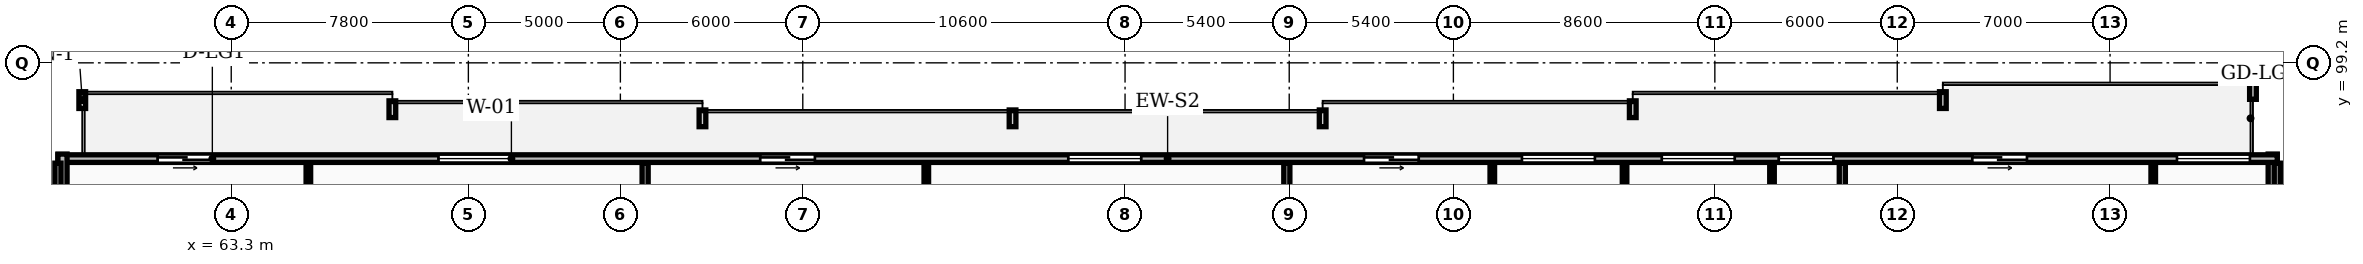
"""IFC4 building model, lengths in metres.
Left out: names, types, materials, properties, quantities, classifications, styles, units other than length and angle.
Written with IfcOpenShell. Run it as: python <this file> out.ifc"""

import sys

from ifc_helpers import new_model, si_unit, direction, frame, frame_2d, origin, place, context, subcontext, project, spatial, rectangle, extrude, element, fill, save


model = new_model("IFC4")
c1 = context("Model", 3, precision=1e-05, world=origin(), true_north=direction((0.0, 1.0)))
c2 = subcontext(c1, "Body", "Model", "MODEL_VIEW")
j1 = project(units=[si_unit("LENGTHUNIT", "METRE"), si_unit("PLANEANGLEUNIT", "RADIAN")], contexts=[c1])
p1 = place(None, origin())
s1 = spatial("IfcSite", under=j1, at=p1, CompositionType="ELEMENT")
p2 = place(p1, origin())
s2 = spatial("IfcBuilding", under=s1, at=p2, CompositionType="ELEMENT")
p3 = place(p2, frame((0.0, 0.0, 139.3)))
s3 = spatial("IfcBuildingStorey", under=s2, at=p3, CompositionType="ELEMENT", Elevation=139.3)
p4 = place(p3, frame((130.45, 92.6, 0.0), z_axis=(0.0, 0.0, 1.0), x_axis=(0.0, 1.0, 0.0)))
e1 = element("IfcWall", 1, at=p4, inside=s3, PredefinedType="STANDARD", context=c2, shape_type="SweptSolid", body=[
    extrude(rectangle(XDim=3.6, YDim=0.3, at=frame_2d((1.8, 0.0))), origin(), (0.0, 0.0, 1.0), 3.31),
])
p5 = place(p3, frame((130.6, 96.05, 0.0), z_axis=(0.0, 0.0, 1.0), x_axis=(-1.0, 0.0, 0.0)))
e2 = element("IfcWall", 2, at=p5, inside=s3, PredefinedType="STANDARD", context=c2, shape_type="SweptSolid", body=[
    extrude(rectangle(XDim=73.0, YDim=0.25, at=frame_2d((36.5, 0.0))), origin(), (0.0, 0.0, 1.0), 3.31),
])
p6 = place(p5, frame((67.921, 0.0, 0.0)))
e3 = element("IfcOpeningElement", 3, at=p6, cuts=e2, PredefinedType="OPENING", context=c2, shape_type="SweptSolid", body=[
    extrude(rectangle(XDim=1.8, YDim=2.2, at=frame_2d((0.9, 1.1))), frame((0.0, 0.135, 0.0), z_axis=(0.0, -1.0, 0.0), x_axis=(1.0, 0.0, 0.0)), (0.0, 0.0, 1.0), 0.27),
])
p7 = place(p5, frame((58.084, 0.0, 0.85)))
e4 = element("IfcOpeningElement", 4, at=p7, cuts=e2, PredefinedType="OPENING", context=c2, shape_type="SweptSolid", body=[
    extrude(rectangle(XDim=2.4, YDim=1.9, at=frame_2d((1.2, 0.95))), frame((0.0, 0.135, 0.0), z_axis=(0.0, -1.0, 0.0), x_axis=(1.0, 0.0, 0.0)), (0.0, 0.0, 1.0), 0.27),
])
p8 = place(p5, frame((48.101, 0.0, 0.0)))
e5 = element("IfcOpeningElement", 5, at=p8, cuts=e2, PredefinedType="OPENING", context=c2, shape_type="SweptSolid", body=[
    extrude(rectangle(XDim=1.8, YDim=2.2, at=frame_2d((0.9, 1.1))), frame((0.0, 0.135, 0.0), z_axis=(0.0, -1.0, 0.0), x_axis=(1.0, 0.0, 0.0)), (0.0, 0.0, 1.0), 0.27),
])
p9 = place(p5, frame((37.368, 0.0, 0.85)))
e6 = element("IfcOpeningElement", 6, at=p9, cuts=e2, PredefinedType="OPENING", context=c2, shape_type="SweptSolid", body=[
    extrude(rectangle(XDim=2.4, YDim=1.9, at=frame_2d((1.2, 0.95))), frame((0.0, 0.135, 0.0), z_axis=(0.0, -1.0, 0.0), x_axis=(1.0, 0.0, 0.0)), (0.0, 0.0, 1.0), 0.27),
])
p10 = place(p5, frame((22.445, 0.0, 0.85)))
e7 = element("IfcOpeningElement", 7, at=p10, cuts=e2, PredefinedType="OPENING", context=c2, shape_type="SweptSolid", body=[
    extrude(rectangle(XDim=2.4, YDim=1.9, at=frame_2d((1.2, 0.95))), frame((0.0, 0.135, 0.0), z_axis=(0.0, -1.0, 0.0), x_axis=(1.0, 0.0, 0.0)), (0.0, 0.0, 1.0), 0.27),
])
p11 = place(p5, frame((17.845, 0.0, 0.85)))
e8 = element("IfcOpeningElement", 8, at=p11, cuts=e2, PredefinedType="OPENING", context=c2, shape_type="SweptSolid", body=[
    extrude(rectangle(XDim=2.4, YDim=1.9, at=frame_2d((1.2, 0.95))), frame((0.0, 0.135, 0.0), z_axis=(0.0, -1.0, 0.0), x_axis=(1.0, 0.0, 0.0)), (0.0, 0.0, 1.0), 0.27),
])
p12 = place(p5, frame((28.239, 0.0, 0.0)))
e9 = element("IfcOpeningElement", 9, at=p12, cuts=e2, PredefinedType="OPENING", context=c2, shape_type="SweptSolid", body=[
    extrude(rectangle(XDim=1.8, YDim=2.2, at=frame_2d((0.9, 1.1))), frame((0.0, 0.135, 0.0), z_axis=(0.0, -1.0, 0.0), x_axis=(1.0, 0.0, 0.0)), (0.0, 0.0, 1.0), 0.27),
])
p13 = place(p5, frame((14.599, 0.0, 0.85)))
e10 = element("IfcOpeningElement", 10, at=p13, cuts=e2, PredefinedType="OPENING", context=c2, shape_type="SweptSolid", body=[
    extrude(rectangle(XDim=1.8, YDim=1.8, at=frame_2d((0.9, 0.9))), frame((0.0, 0.135, 0.0), z_axis=(0.0, -1.0, 0.0), x_axis=(1.0, 0.0, 0.0)), (0.0, 0.0, 1.0), 0.27),
])
p14 = place(p5, frame((8.234, 0.0, 0.0)))
e11 = element("IfcOpeningElement", 11, at=p14, cuts=e2, PredefinedType="OPENING", context=c2, shape_type="SweptSolid", body=[
    extrude(rectangle(XDim=1.8, YDim=2.2, at=frame_2d((0.9, 1.1))), frame((0.0, 0.135, 0.0), z_axis=(0.0, -1.0, 0.0), x_axis=(1.0, 0.0, 0.0)), (0.0, 0.0, 1.0), 0.27),
])
p15 = place(p5, frame((0.9, 0.0, 0.85)))
e12 = element("IfcOpeningElement", 12, at=p15, cuts=e2, PredefinedType="OPENING", context=c2, shape_type="SweptSolid", body=[
    extrude(rectangle(XDim=2.4, YDim=1.9, at=frame_2d((1.2, 0.95))), frame((0.0, 0.135, 0.0), z_axis=(0.0, -1.0, 0.0), x_axis=(1.0, 0.0, 0.0)), (0.0, 0.0, 1.0), 0.27),
])
p16 = place(p3, frame((57.75, 96.2, 0.0), z_axis=(0.0, 0.0, 1.0), x_axis=(0.0, -1.0, 0.0)))
e13 = element("IfcWall", 13, at=p16, inside=s3, PredefinedType="STANDARD", context=c2, shape_type="SweptSolid", body=[
    extrude(rectangle(XDim=3.6, YDim=0.3, at=frame_2d((1.8, 0.0))), origin(), (0.0, 0.0, 1.0), 3.31),
])
for number, where, z_axis, x_axis in (
    (14, (57.6, 69.83, 0.0), (0.0, 0.0, 1.0), (0.0, 1.0, 0.0)),
    (15, (130.6, 69.83, 0.0), (0.0, 0.0, 1.0), (0.0, 1.0, 0.0)),
    (16, (76.914, 69.83, 0.0), (0.0, 0.0, 1.0), (0.0, 1.0, 0.0)),
):
    element("IfcWall", number, at=place(p3, frame(where, z_axis=z_axis, x_axis=x_axis)), inside=s3, PredefinedType="PARTITIONING", context=c2, shape_type="SweptSolid", body=[
        extrude(rectangle(XDim=26.07, YDim=0.2, at=frame_2d((13.035, 0.0))), origin(), (0.0, 0.0, 1.0), 3.31),
    ])
p17 = place(p3, frame((65.837, 91.08, 0.0), z_axis=(0.0, 0.0, 1.0), x_axis=(0.0, 1.0, 0.0)))
e17 = element("IfcWall", 17, at=p17, inside=s3, PredefinedType="PARTITIONING", context=c2, shape_type="SweptSolid", body=[
    extrude(rectangle(XDim=4.82, YDim=0.15, at=frame_2d((2.41, 0.0))), origin(), (0.0, 0.0, 1.0), 3.31),
])
p18 = place(p3, frame((98.021, 69.83, 0.0), z_axis=(0.0, 0.0, 1.0), x_axis=(0.0, 1.0, 0.0)))
e18 = element("IfcWall", 18, at=p18, inside=s3, PredefinedType="PARTITIONING", context=c2, shape_type="SweptSolid", body=[
    extrude(rectangle(XDim=26.07, YDim=0.2, at=frame_2d((13.035, 0.0))), origin(), (0.0, 0.0, 1.0), 3.31),
])
p19 = place(p3, frame((86.163, 91.08, 0.0), z_axis=(0.0, 0.0, 1.0), x_axis=(0.0, 1.0, 0.0)))
e19 = element("IfcWall", 19, at=p19, inside=s3, PredefinedType="PARTITIONING", context=c2, shape_type="SweptSolid", body=[
    extrude(rectangle(XDim=4.82, YDim=0.15, at=frame_2d((2.41, 0.0))), origin(), (0.0, 0.0, 1.0), 3.31),
])
p20 = place(p3, frame((116.293, 69.83, 0.0), z_axis=(0.0, 0.0, 1.0), x_axis=(0.0, 1.0, 0.0)))
e20 = element("IfcWall", 20, at=p20, inside=s3, PredefinedType="PARTITIONING", context=c2, shape_type="SweptSolid", body=[
    extrude(rectangle(XDim=26.07, YDim=0.2, at=frame_2d((13.035, 0.0))), origin(), (0.0, 0.0, 1.0), 3.31),
])
p21 = place(p3, frame((109.13, 91.08, 0.0), z_axis=(0.0, 0.0, 1.0), x_axis=(0.0, 1.0, 0.0)))
e21 = element("IfcWall", 21, at=p21, inside=s3, PredefinedType="PARTITIONING", context=c2, shape_type="SweptSolid", body=[
    extrude(rectangle(XDim=4.82, YDim=0.15, at=frame_2d((2.41, 0.0))), origin(), (0.0, 0.0, 1.0), 3.31),
])
p22 = place(p3, frame((104.78, 85.94, 0.0), z_axis=(0.0, 0.0, 1.0), x_axis=(0.0, 1.0, 0.0)))
e22 = element("IfcWall", 22, at=p22, inside=s3, PredefinedType="PARTITIONING", context=c2, shape_type="SweptSolid", body=[
    extrude(rectangle(XDim=9.96, YDim=0.15, at=frame_2d((4.98, 0.0))), origin(), (0.0, 0.0, 1.0), 3.31),
])
p23 = place(p22, frame((2.936, 0.0, 0.0)))
e23 = element("IfcOpeningElement", 23, at=p23, cuts=e22, PredefinedType="OPENING", context=c2, shape_type="SweptSolid", body=[
    extrude(rectangle(XDim=0.92, YDim=2.08, at=frame_2d((0.46, 1.04))), frame((0.0, 0.085, 0.0), z_axis=(0.0, -1.0, 0.0), x_axis=(1.0, 0.0, 0.0)), (0.0, 0.0, 1.0), 0.17),
])
p24 = place(p3, frame((113.98, 88.67, 0.0), z_axis=(0.0, 0.0, 1.0), x_axis=(0.0, 1.0, 0.0)))
e24 = element("IfcWall", 24, at=p24, inside=s3, PredefinedType="PARTITIONING", context=c2, shape_type="SweptSolid", body=[
    extrude(rectangle(XDim=7.23, YDim=0.15, at=frame_2d((3.615, 0.0))), origin(), (0.0, 0.0, 1.0), 3.31),
])
p25 = place(p24, frame((0.26, 0.0, 0.0)))
e25 = element("IfcOpeningElement", 25, at=p25, cuts=e24, PredefinedType="OPENING", context=c2, shape_type="SweptSolid", body=[
    extrude(rectangle(XDim=0.92, YDim=2.08, at=frame_2d((0.46, 1.04))), frame((0.0, 0.085, 0.0), z_axis=(0.0, -1.0, 0.0), x_axis=(1.0, 0.0, 0.0)), (0.0, 0.0, 1.0), 0.17),
])
p26 = place(p3, frame((126.52, 85.94, 0.0), z_axis=(0.0, 0.0, 1.0), x_axis=(0.0, 1.0, 0.0)))
e26 = element("IfcWall", 26, at=p26, inside=s3, PredefinedType="PARTITIONING", context=c2, shape_type="SweptSolid", body=[
    extrude(rectangle(XDim=9.96, YDim=0.15, at=frame_2d((4.98, 0.0))), origin(), (0.0, 0.0, 1.0), 3.31),
])
p27 = place(p26, frame((1.43, 0.0, 0.0)))
e27 = element("IfcOpeningElement", 27, at=p27, cuts=e26, PredefinedType="OPENING", context=c2, shape_type="SweptSolid", body=[
    extrude(rectangle(XDim=0.84, YDim=2.04, at=frame_2d((0.42, 1.02))), frame((0.0, 0.085, 0.0), z_axis=(0.0, -1.0, 0.0), x_axis=(1.0, 0.0, 0.0)), (0.0, 0.0, 1.0), 0.17),
])
p28 = place(p26, frame((3.002, 0.0, 0.0)))
e28 = element("IfcOpeningElement", 28, at=p28, cuts=e26, PredefinedType="OPENING", context=c2, shape_type="SweptSolid", body=[
    extrude(rectangle(XDim=0.84, YDim=2.04, at=frame_2d((0.42, 1.02))), frame((0.0, 0.085, 0.0), z_axis=(0.0, -1.0, 0.0), x_axis=(1.0, 0.0, 0.0)), (0.0, 0.0, 1.0), 0.17),
])
p29 = place(p26, frame((6.669, 0.0, 0.0)))
e29 = element("IfcOpeningElement", 29, at=p29, cuts=e26, PredefinedType="OPENING", context=c2, shape_type="SweptSolid", body=[
    extrude(rectangle(XDim=0.88, YDim=2.06, at=frame_2d((0.44, 1.03))), frame((0.0, 0.085, 0.0), z_axis=(0.0, -1.0, 0.0), x_axis=(1.0, 0.0, 0.0)), (0.0, 0.0, 1.0), 0.17),
])
p30 = place(p6, origin())
e30 = element("IfcDoor", 30, at=p30, inside=s3, OperationType="SLIDING_TO_LEFT", PredefinedType="DOOR", context=c2, shape_type="SweptSolid", body=[
    extrude(rectangle(XDim=1.8, YDim=2.2, at=frame_2d((0.9, 1.1))), frame((0.0, 0.025, 0.0), z_axis=(0.0, -1.0, 0.0), x_axis=(1.0, 0.0, 0.0)), (0.0, 0.0, 1.0), 0.05),
])
fill(e3, e30)
p31 = place(p7, origin())
e31 = element("IfcWindow", 31, at=p31, inside=s3, PartitioningType="DOUBLE_PANEL_VERTICAL", PredefinedType="WINDOW", context=c2, shape_type="SweptSolid", body=[
    extrude(rectangle(XDim=2.4, YDim=1.9, at=frame_2d((1.2, 0.95))), frame((0.0, 0.03, 0.0), z_axis=(0.0, -1.0, 0.0), x_axis=(1.0, 0.0, 0.0)), (0.0, 0.0, 1.0), 0.06),
])
fill(e4, e31)
p32 = place(p8, origin())
e32 = element("IfcDoor", 32, at=p32, inside=s3, OperationType="SLIDING_TO_LEFT", PredefinedType="DOOR", context=c2, shape_type="SweptSolid", body=[
    extrude(rectangle(XDim=1.8, YDim=2.2, at=frame_2d((0.9, 1.1))), frame((0.0, 0.025, 0.0), z_axis=(0.0, -1.0, 0.0), x_axis=(1.0, 0.0, 0.0)), (0.0, 0.0, 1.0), 0.05),
])
fill(e5, e32)
p33 = place(p9, origin())
e33 = element("IfcWindow", 33, at=p33, inside=s3, PartitioningType="DOUBLE_PANEL_VERTICAL", PredefinedType="WINDOW", context=c2, shape_type="SweptSolid", body=[
    extrude(rectangle(XDim=2.4, YDim=1.9, at=frame_2d((1.2, 0.95))), frame((0.0, 0.03, 0.0), z_axis=(0.0, -1.0, 0.0), x_axis=(1.0, 0.0, 0.0)), (0.0, 0.0, 1.0), 0.06),
])
fill(e6, e33)
p34 = place(p10, origin())
e34 = element("IfcWindow", 34, at=p34, inside=s3, PartitioningType="DOUBLE_PANEL_VERTICAL", PredefinedType="WINDOW", context=c2, shape_type="SweptSolid", body=[
    extrude(rectangle(XDim=2.4, YDim=1.9, at=frame_2d((1.2, 0.95))), frame((0.0, 0.03, 0.0), z_axis=(0.0, -1.0, 0.0), x_axis=(1.0, 0.0, 0.0)), (0.0, 0.0, 1.0), 0.06),
])
fill(e7, e34)
p35 = place(p11, origin())
e35 = element("IfcWindow", 35, at=p35, inside=s3, PartitioningType="DOUBLE_PANEL_VERTICAL", PredefinedType="WINDOW", context=c2, shape_type="SweptSolid", body=[
    extrude(rectangle(XDim=2.4, YDim=1.9, at=frame_2d((1.2, 0.95))), frame((0.0, 0.03, 0.0), z_axis=(0.0, -1.0, 0.0), x_axis=(1.0, 0.0, 0.0)), (0.0, 0.0, 1.0), 0.06),
])
fill(e8, e35)
p36 = place(p12, origin())
e36 = element("IfcDoor", 36, at=p36, inside=s3, OperationType="SLIDING_TO_LEFT", PredefinedType="DOOR", context=c2, shape_type="SweptSolid", body=[
    extrude(rectangle(XDim=1.8, YDim=2.2, at=frame_2d((0.9, 1.1))), frame((0.0, 0.025, 0.0), z_axis=(0.0, -1.0, 0.0), x_axis=(1.0, 0.0, 0.0)), (0.0, 0.0, 1.0), 0.05),
])
fill(e9, e36)
p37 = place(p13, origin())
e37 = element("IfcWindow", 37, at=p37, inside=s3, PartitioningType="SINGLE_PANEL", PredefinedType="WINDOW", context=c2, shape_type="SweptSolid", body=[
    extrude(rectangle(XDim=1.8, YDim=1.8, at=frame_2d((0.9, 0.9))), frame((0.0, 0.03, 0.0), z_axis=(0.0, -1.0, 0.0), x_axis=(1.0, 0.0, 0.0)), (0.0, 0.0, 1.0), 0.06),
])
fill(e10, e37)
p38 = place(p14, origin())
e38 = element("IfcDoor", 38, at=p38, inside=s3, OperationType="SLIDING_TO_LEFT", PredefinedType="DOOR", context=c2, shape_type="SweptSolid", body=[
    extrude(rectangle(XDim=1.8, YDim=2.2, at=frame_2d((0.9, 1.1))), frame((0.0, 0.025, 0.0), z_axis=(0.0, -1.0, 0.0), x_axis=(1.0, 0.0, 0.0)), (0.0, 0.0, 1.0), 0.05),
])
fill(e11, e38)
p39 = place(p15, origin())
e39 = element("IfcWindow", 39, at=p39, inside=s3, PartitioningType="DOUBLE_PANEL_VERTICAL", PredefinedType="WINDOW", context=c2, shape_type="SweptSolid", body=[
    extrude(rectangle(XDim=2.4, YDim=1.9, at=frame_2d((1.2, 0.95))), frame((0.0, 0.03, 0.0), z_axis=(0.0, -1.0, 0.0), x_axis=(1.0, 0.0, 0.0)), (0.0, 0.0, 1.0), 0.06),
])
fill(e12, e39)
save(model, sys.argv[1])
